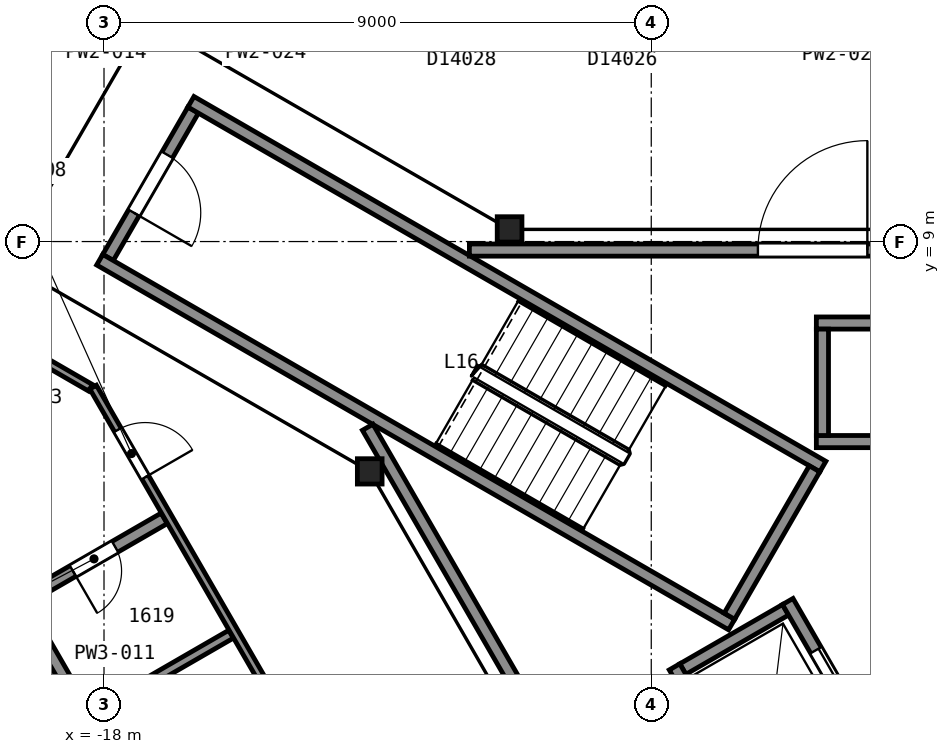
"""IFC4 building model, lengths in metres.
Left out: names, types, materials, properties, quantities, classifications, styles, units other than length and angle.
Written with IfcOpenShell. Run it as: python <this file> out.ifc"""

import sys

from ifc_helpers import new_model, si_unit, direction, frame, frame_2d, origin, origin_2d, place, context, subcontext, project, spatial, rectangle, i_section, extrude, element, fill, save


model = new_model("IFC4")
c1 = context("Model", 3, precision=1e-05, world=origin(), true_north=direction((0.0, 1.0)))
c2 = subcontext(c1, "Body", "Model", "MODEL_VIEW")
j1 = project(units=[si_unit("LENGTHUNIT", "METRE"), si_unit("PLANEANGLEUNIT", "RADIAN")], contexts=[c1])
p1 = place(None, origin())
s1 = spatial("IfcSite", under=j1, at=p1, CompositionType="ELEMENT")
p2 = place(p1, origin())
s2 = spatial("IfcBuilding", under=s1, at=p2, CompositionType="ELEMENT")
p3 = place(p2, frame((0.0, 0.0, 72.8)))
s3 = spatial("IfcBuildingStorey", under=s2, at=p3, CompositionType="ELEMENT", Elevation=72.8)
for number, where, z_axis, x_axis in (
    (1, (-11.33, 9.2, 0.0), (0.0, 0.0, 1.0), (1.0, 0.0, 0.0)),
    (2, (-13.63, 5.22, 0.0), (0.0, 0.0, 1.0), (1.0, 0.0, 0.0)),
):
    element("IfcColumn", number, at=place(p3, frame(where, z_axis=z_axis, x_axis=x_axis)), inside=s3, PredefinedType="COLUMN", context=c2, shape_type="SweptSolid", body=[
        extrude(i_section(OverallWidth=0.406, OverallDepth=0.417, WebThickness=0.03, FlangeThickness=0.048, FilletRadius=0.015, at=origin_2d()), origin(), (0.0, 0.0, 1.0), 3.6),
    ])
p4 = place(p3, frame((-16.534, 11.162, 0.0), z_axis=(0.0, 0.0, 1.0), x_axis=(-0.49998411664, -0.866034573852, 0.0)))
e3 = element("IfcWall", 3, at=p4, inside=s3, PredefinedType="PARTITIONING", context=c2, shape_type="SweptSolid", body=[
    extrude(rectangle(XDim=2.8, YDim=0.2, at=frame_2d((1.4, 0.0))), origin(), (0.0, 0.0, 1.0), 3.35),
])
p5 = place(p4, frame((0.85, 0.0, 0.0)))
e4 = element("IfcOpeningElement", 4, at=p5, cuts=e3, PredefinedType="OPENING", context=c2, shape_type="SweptSolid", body=[
    extrude(rectangle(XDim=1.1, YDim=2.1, at=frame_2d((0.55, 1.05))), frame((0.0, 0.11, 0.0), z_axis=(0.0, -1.0, 0.0), x_axis=(1.0, 0.0, 0.0)), (0.0, 0.0, 1.0), 0.22),
])
for number, where, z_axis, x_axis in (
    (5, (-7.678, 2.701, 0.0), (0.0, 0.0, 1.0), (-0.866, 0.5, 0.0)),
    (6, (-6.178, 5.299, 0.0), (0.0, 0.0, 1.0), (-0.866, 0.5, 0.0)),
):
    element("IfcWall", number, at=place(p3, frame(where, z_axis=z_axis, x_axis=x_axis)), inside=s3, PredefinedType="PARTITIONING", context=c2, shape_type="SweptSolid", body=[
        extrude(rectangle(XDim=12.0, YDim=0.2, at=frame_2d((6.0, 0.0))), origin(), (0.0, 0.0, 1.0), 3.35),
    ])
p6 = place(p3, frame((-6.315, 5.262, 0.0), z_axis=(0.0, 0.0, 1.0), x_axis=(-0.500049511043, -0.865996816683, 0.0)))
e7 = element("IfcWall", 7, at=p6, inside=s3, PredefinedType="PARTITIONING", context=c2, shape_type="SweptSolid", body=[
    extrude(rectangle(XDim=2.8, YDim=0.2, at=frame_2d((1.4, 0.0))), origin(), (0.0, 0.0, 1.0), 3.35),
])
for number, where, z_axis, x_axis in (
    (8, (-6.285, 5.71, 0.0), (0.0, 0.0, 1.0), (1.0, 0.0, 0.0)),
    (9, (-6.285, 7.66, 0.0), (0.0, 0.0, 1.0), (1.0, 0.0, 0.0)),
):
    element("IfcWall", number, at=place(p3, frame(where, z_axis=z_axis, x_axis=x_axis)), inside=s3, PredefinedType="PARTITIONING", context=c2, shape_type="SweptSolid", body=[
        extrude(rectangle(XDim=2.35, YDim=0.2, at=frame_2d((1.175, 0.0))), origin(), (0.0, 0.0, 1.0), 3.6),
    ])
p7 = place(p3, frame((-8.48, 1.969, 0.0), z_axis=(0.0, 0.0, 1.0), x_axis=(0.866000020948, 0.500043961785, 0.0)))
e10 = element("IfcWall", 10, at=p7, inside=s3, PredefinedType="PARTITIONING", context=c2, shape_type="SweptSolid", body=[
    extrude(rectangle(XDim=1.95, YDim=0.2, at=frame_2d((0.975, 0.0))), origin(), (0.0, 0.0, 1.0), 3.6),
])
p8 = place(p3, frame((-6.185, 5.81, 0.0), z_axis=(0.0, 0.0, 1.0), x_axis=(0.0, 1.0, 0.0)))
e11 = element("IfcWall", 11, at=p8, inside=s3, PredefinedType="PARTITIONING", context=c2, shape_type="SweptSolid", body=[
    extrude(rectangle(XDim=1.75, YDim=0.2, at=frame_2d((0.875, 0.0))), origin(), (0.0, 0.0, 1.0), 3.6),
])
p9 = place(p3, frame((-5.28, 0.525, 0.0), z_axis=(0.0, 0.0, 1.0), x_axis=(-0.500037662692, 0.866003658127, 0.0)))
e12 = element("IfcWall", 12, at=p9, inside=s3, PredefinedType="PARTITIONING", context=c2, shape_type="SweptSolid", body=[
    extrude(rectangle(XDim=2.95, YDim=0.2, at=frame_2d((1.475, 0.0))), origin(), (0.0, 0.0, 1.0), 3.6),
])
p10 = place(p9, frame((0.925, 0.0, 0.0)))
e13 = element("IfcOpeningElement", 13, at=p10, cuts=e12, PredefinedType="OPENING", context=c2, shape_type="SweptSolid", body=[
    extrude(rectangle(XDim=1.1, YDim=2.1, at=frame_2d((0.55, 1.05))), frame((0.0, 0.11, 0.0), z_axis=(0.0, -1.0, 0.0), x_axis=(1.0, 0.0, 0.0)), (0.0, 0.0, 1.0), 0.22),
])
p11 = place(p3, frame((-7.242, -0.376, 0.0), z_axis=(0.0, 0.0, 1.0), x_axis=(-0.499996545922, 0.866027397988, 0.0)))
e14 = element("IfcWall", 14, at=p11, inside=s3, PredefinedType="PARTITIONING", context=c2, shape_type="SweptSolid", body=[
    extrude(rectangle(XDim=2.75, YDim=0.2, at=frame_2d((1.375, 0.0))), origin(), (0.0, 0.0, 1.0), 3.6),
])
p12 = place(p3, frame((-13.664, 5.946, 0.0), z_axis=(0.0, 0.0, 1.0), x_axis=(0.499994327219, -0.866028678941, 0.0)))
e15 = element("IfcWall", 15, at=p12, inside=s3, PredefinedType="PARTITIONING", context=c2, shape_type="SweptSolid", body=[
    extrude(rectangle(XDim=23.968, YDim=0.2, at=frame_2d((11.984, 0.0))), origin(), (0.0, 0.0, 1.0), 3.35),
])
p13 = place(p3, frame((0.263, 8.86, 0.0), z_axis=(0.0, 0.0, 1.0), x_axis=(-1.0, 0.0, 0.0)))
e16 = element("IfcWall", 16, at=p13, inside=s3, PredefinedType="PARTITIONING", context=c2, shape_type="SweptSolid", body=[
    extrude(rectangle(XDim=12.254, YDim=0.2, at=frame_2d((6.127, 0.0))), origin(), (0.0, 0.0, 1.0), 3.35),
])
p14 = place(p13, frame((5.709, 0.0, 0.0)))
e17 = element("IfcOpeningElement", 17, at=p14, cuts=e16, PredefinedType="OPENING", context=c2, shape_type="SweptSolid", body=[
    extrude(rectangle(XDim=1.8, YDim=2.1, at=frame_2d((0.9, 1.05))), frame((0.0, 0.11, 0.0), z_axis=(0.0, -1.0, 0.0), x_axis=(1.0, 0.0, 0.0)), (0.0, 0.0, 1.0), 0.22),
])
p15 = place(p3, frame((-23.26, -1.701, 0.0), z_axis=(0.0, 0.0, 1.0), x_axis=(0.866027021296, 0.499997198377, 0.0)))
e18 = element("IfcWall", 18, at=p15, inside=s3, PredefinedType="PARTITIONING", context=c2, shape_type="SweptSolid", body=[
    extrude(rectangle(XDim=8.487, YDim=0.15, at=frame_2d((4.243, 0.0))), origin(), (0.0, 0.0, 1.0), 2.613),
])
p16 = place(p3, frame((-19.327, 2.994, 0.0), z_axis=(0.0, 0.0, 1.0), x_axis=(0.500042536776, -0.866000843773, 0.0)))
e19 = element("IfcWall", 19, at=p16, inside=s3, PredefinedType="PARTITIONING", context=c2, shape_type="SweptSolid", body=[
    extrude(rectangle(XDim=2.025, YDim=0.2, at=frame_2d((1.012, 0.0))), origin(), (0.0, 0.0, 1.0), 2.613),
])
p17 = place(p3, frame((-17.01, 4.447, 0.0), z_axis=(0.0, 0.0, 1.0), x_axis=(-0.866033446572, -0.499986069224, 0.0)))
e20 = element("IfcWall", 20, at=p17, inside=s3, PredefinedType="PARTITIONING", context=c2, shape_type="SweptSolid", body=[
    extrude(rectangle(XDim=2.833, YDim=0.2, at=frame_2d((1.416, 0.0))), origin(), (0.0, 0.0, 1.0), 2.613),
])
p18 = place(p17, frame((0.933, 0.0, 0.0)))
e21 = element("IfcOpeningElement", 21, at=p18, cuts=e20, PredefinedType="OPENING", context=c2, shape_type="SweptSolid", body=[
    extrude(rectangle(XDim=0.8, YDim=2.1, at=frame_2d((0.4, 1.05))), frame((0.0, 0.11, 0.0), z_axis=(0.0, -1.0, 0.0), x_axis=(1.0, 0.0, 0.0)), (0.0, 0.0, 1.0), 0.22),
])
p19 = place(p3, frame((-19.132, 7.121, 0.0), z_axis=(0.0, 0.0, 1.0), x_axis=(0.865876245925, -0.500258260045, 0.0)))
e22 = element("IfcWall", 22, at=p19, inside=s3, PredefinedType="PARTITIONING", context=c2, shape_type="SweptSolid", body=[
    extrude(rectangle(XDim=1.052, YDim=0.125, at=frame_2d((0.526, 0.0))), origin(), (0.0, 0.0, 1.0), 2.613),
])
p20 = place(p3, frame((-3.766, -18.358, 0.0), z_axis=(0.0, 0.0, 1.0), x_axis=(-0.500003973642, 0.866023109589, 0.0)))
e23 = element("IfcWall", 23, at=p20, inside=s3, PredefinedType="PARTITIONING", context=c2, shape_type="SweptSolid", body=[
    extrude(rectangle(XDim=28.826, YDim=0.125, at=frame_2d((14.413, 0.0))), origin(), (0.0, 0.0, 1.0), 2.613),
])
p21 = place(p20, frame((27.114, 0.0, 0.0)))
e24 = element("IfcOpeningElement", 24, at=p21, cuts=e23, PredefinedType="OPENING", context=c2, shape_type="SweptSolid", body=[
    extrude(rectangle(XDim=0.9, YDim=2.1, at=frame_2d((0.45, 1.05))), frame((0.0, 0.073, 0.0), z_axis=(0.0, -1.0, 0.0), x_axis=(1.0, 0.0, 0.0)), (0.0, 0.0, 1.0), 0.145),
])
p22 = place(p20, frame((20.322, 0.0, 0.0)))
e25 = element("IfcOpeningElement", 25, at=p22, cuts=e23, PredefinedType="OPENING", context=c2, shape_type="SweptSolid", body=[
    extrude(rectangle(XDim=0.9, YDim=2.1, at=frame_2d((0.45, 1.05))), frame((0.0, 0.073, 0.0), z_axis=(0.0, -1.0, 0.0), x_axis=(1.0, 0.0, 0.0)), (0.0, 0.0, 1.0), 0.145),
])
p23 = place(p20, frame((17.68, 0.0, 0.0)))
e26 = element("IfcOpeningElement", 26, at=p23, cuts=e23, PredefinedType="OPENING", context=c2, shape_type="SweptSolid", body=[
    extrude(rectangle(XDim=0.9, YDim=2.1, at=frame_2d((0.45, 1.05))), frame((0.0, 0.073, 0.0), z_axis=(0.0, -1.0, 0.0), x_axis=(1.0, 0.0, 0.0)), (0.0, 0.0, 1.0), 0.145),
])
p24 = place(p20, frame((10.836, 0.0, 0.0)))
e27 = element("IfcOpeningElement", 27, at=p24, cuts=e23, PredefinedType="OPENING", context=c2, shape_type="SweptSolid", body=[
    extrude(rectangle(XDim=0.9, YDim=2.1, at=frame_2d((0.45, 1.05))), frame((0.0, 0.073, 0.0), z_axis=(0.0, -1.0, 0.0), x_axis=(1.0, 0.0, 0.0)), (0.0, 0.0, 1.0), 0.145),
])
p25 = place(p20, frame((7.342, 0.0, 0.0)))
e28 = element("IfcOpeningElement", 28, at=p25, cuts=e23, PredefinedType="OPENING", context=c2, shape_type="SweptSolid", body=[
    extrude(rectangle(XDim=0.9, YDim=2.1, at=frame_2d((0.45, 1.05))), frame((0.0, 0.073, 0.0), z_axis=(0.0, -1.0, 0.0), x_axis=(1.0, 0.0, 0.0)), (0.0, 0.0, 1.0), 0.145),
])
p26 = place(p5, origin())
e29 = element("IfcDoor", 29, at=p26, inside=s3, OperationType="SINGLE_SWING_RIGHT", PredefinedType="DOOR", context=c2, shape_type="SweptSolid", body=[
    extrude(rectangle(XDim=1.1, YDim=2.1, at=frame_2d((0.55, 1.05))), frame((0.0, 0.025, 0.0), z_axis=(0.0, -1.0, 0.0), x_axis=(1.0, 0.0, 0.0)), (0.0, 0.0, 1.0), 0.05),
])
fill(e4, e29)
p27 = place(p10, origin())
e30 = element("IfcDoor", 30, at=p27, inside=s3, OperationType="SLIDING_TO_LEFT", PredefinedType="DOOR", context=c2, shape_type="SweptSolid", body=[
    extrude(rectangle(XDim=1.1, YDim=2.1, at=frame_2d((0.55, 1.05))), frame((0.0, 0.025, 0.0), z_axis=(0.0, -1.0, 0.0), x_axis=(1.0, 0.0, 0.0)), (0.0, 0.0, 1.0), 0.05),
])
fill(e13, e30)
p28 = place(p14, origin())
e31 = element("IfcDoor", 31, at=p28, inside=s3, OperationType="DOUBLE_DOOR_SINGLE_SWING", PredefinedType="DOOR", context=c2, shape_type="SweptSolid", body=[
    extrude(rectangle(XDim=1.8, YDim=2.1, at=frame_2d((0.9, 1.05))), frame((0.0, 0.025, 0.0), z_axis=(0.0, -1.0, 0.0), x_axis=(1.0, 0.0, 0.0)), (0.0, 0.0, 1.0), 0.05),
])
fill(e17, e31)
p29 = place(p18, origin())
e32 = element("IfcDoor", 32, at=p29, inside=s3, OperationType="SINGLE_SWING_RIGHT", PredefinedType="DOOR", context=c2, shape_type="SweptSolid", body=[
    extrude(rectangle(XDim=0.8, YDim=2.1, at=frame_2d((0.4, 1.05))), frame((0.0, 0.025, 0.0), z_axis=(0.0, -1.0, 0.0), x_axis=(1.0, 0.0, 0.0)), (0.0, 0.0, 1.0), 0.05),
])
fill(e21, e32)
p30 = place(p21, origin())
e33 = element("IfcDoor", 33, at=p30, inside=s3, OperationType="SINGLE_SWING_LEFT", PredefinedType="DOOR", context=c2, shape_type="SweptSolid", body=[
    extrude(rectangle(XDim=0.9, YDim=2.1, at=frame_2d((0.45, 1.05))), frame((0.0, 0.025, 0.0), z_axis=(0.0, -1.0, 0.0), x_axis=(1.0, 0.0, 0.0)), (0.0, 0.0, 1.0), 0.05),
])
fill(e24, e33)
save(model, sys.argv[1])
